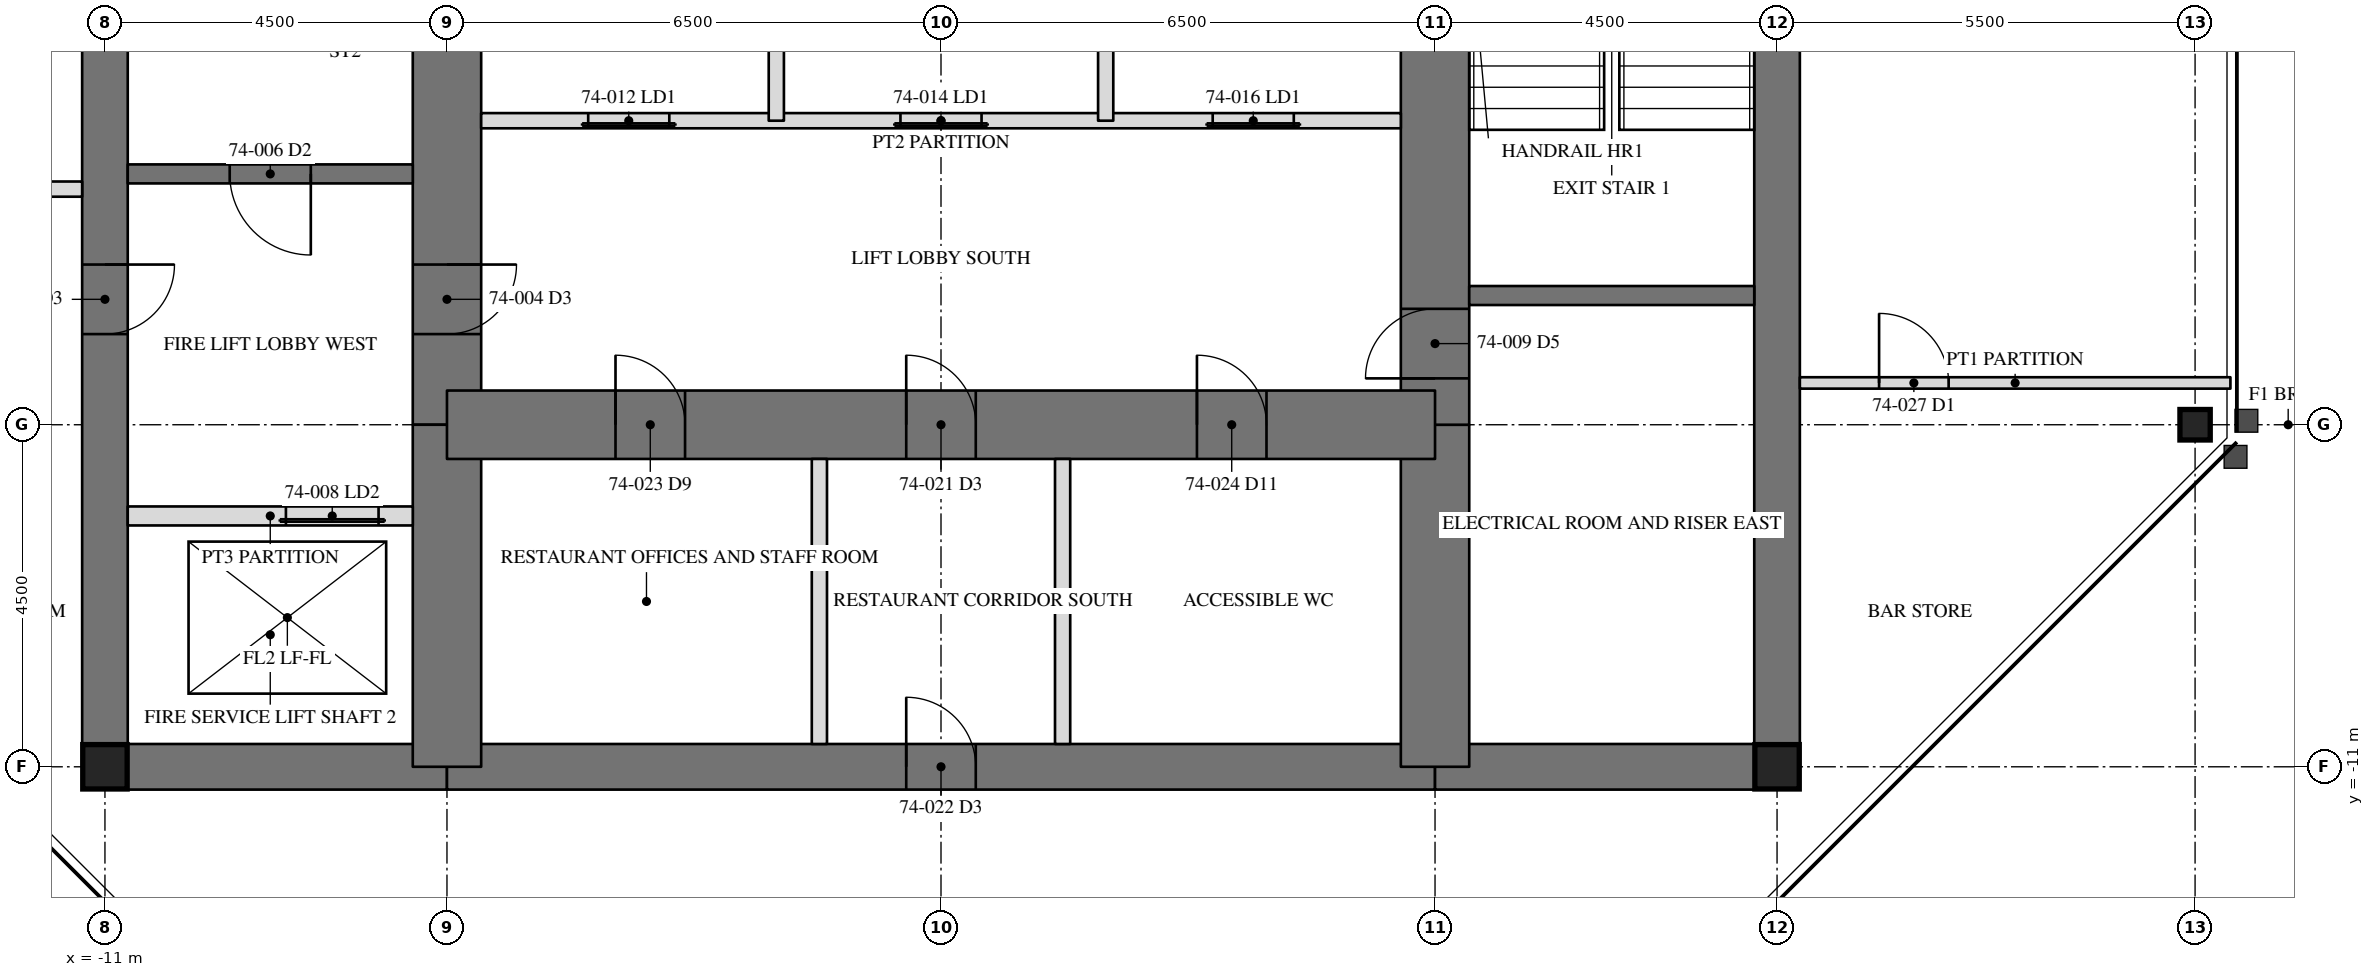
"""IFC4 building model, lengths in metres.
Left out: names, types, materials, properties, quantities, classifications, styles, units other than length and angle.
Written with IfcOpenShell. Run it as: python <this file> out.ifc"""

import sys

from ifc_helpers import new_model, si_unit, direction, frame, frame_2d, origin, origin_2d, place, context, subcontext, project, spatial, rectangle, hollow_rectangle, i_section, extrude, element, fill, save


model = new_model("IFC4")
c1 = context("Model", 3, precision=1e-05, world=origin(), true_north=direction((0.0, 1.0)))
c2 = subcontext(c1, "Body", "Model", "MODEL_VIEW")
j1 = project(units=[si_unit("LENGTHUNIT", "METRE"), si_unit("PLANEANGLEUNIT", "RADIAN")], contexts=[c1])
p1 = place(None, origin())
s1 = spatial("IfcSite", under=j1, at=p1, CompositionType="ELEMENT")
p2 = place(p1, origin())
s2 = spatial("IfcBuilding", under=s1, at=p2, CompositionType="ELEMENT")
p3 = place(p2, frame((0.0, 0.0, 299.2)))
s3 = spatial("IfcBuildingStorey", under=s2, at=p3, CompositionType="ELEMENT", Elevation=299.2)
p4 = place(p3, frame((16.5, -6.5, 0.0), z_axis=(0.0, 0.0, 1.0), x_axis=(0.0, 1.0, 0.0)))
e1 = element("IfcColumn", 1, at=p4, inside=s3, PredefinedType="COLUMN", context=c2, shape_type="SweptSolid", body=[
    extrude(i_section(OverallWidth=0.401, OverallDepth=0.399, WebThickness=0.025, FlangeThickness=0.04, at=origin_2d()), origin(), (0.0, 0.0, 1.0), 5.0),
])
p5 = place(p3, frame((11.0, -11.0, 0.0), z_axis=(0.0, 0.0, 1.0), x_axis=(0.0, 1.0, 0.0)))
e2 = element("IfcWall", 2, at=p5, inside=s3, PredefinedType="SHEAR", context=c2, shape_type="SweptSolid", body=[
    extrude(rectangle(XDim=22.0, YDim=0.6, at=frame_2d((11.0, 0.0))), origin(), (0.0, 0.0, 1.0), 5.0),
])
p6 = place(p5, frame((15.393, 0.0, 0.0)))
e3 = element("IfcOpeningElement", 3, at=p6, cuts=e2, PredefinedType="OPENING", context=c2, shape_type="SweptSolid", body=[
    extrude(rectangle(XDim=0.915, YDim=2.134, at=frame_2d((0.458, 1.067))), frame((0.0, 0.31, 0.0), z_axis=(0.0, -1.0, 0.0), x_axis=(1.0, 0.0, 0.0)), (0.0, 0.0, 1.0), 0.62),
])
p7 = place(p3, frame((-11.0, 11.0, 0.0), z_axis=(0.0, 0.0, 1.0), x_axis=(0.0, -1.0, 0.0)))
e4 = element("IfcWall", 4, at=p7, inside=s3, PredefinedType="SHEAR", context=c2, shape_type="SweptSolid", body=[
    extrude(rectangle(XDim=22.0, YDim=0.6, at=frame_2d((11.0, 0.0))), origin(), (0.0, 0.0, 1.0), 5.0),
])
p8 = place(p7, frame((15.393, 0.0, 0.0)))
e5 = element("IfcOpeningElement", 5, at=p8, cuts=e4, PredefinedType="OPENING", context=c2, shape_type="SweptSolid", body=[
    extrude(rectangle(XDim=0.915, YDim=2.134, at=frame_2d((0.458, 1.067))), frame((0.0, 0.31, 0.0), z_axis=(0.0, -1.0, 0.0), x_axis=(1.0, 0.0, 0.0)), (0.0, 0.0, 1.0), 0.62),
])
p9 = place(p3, frame((-11.0, -11.0, 0.0), z_axis=(0.0, 0.0, 1.0), x_axis=(1.0, 0.0, 0.0)))
e6 = element("IfcWall", 6, at=p9, inside=s3, PredefinedType="SHEAR", context=c2, shape_type="SweptSolid", body=[
    extrude(rectangle(XDim=4.5, YDim=0.6, at=frame_2d((2.25, 0.0))), origin(), (0.0, 0.0, 1.0), 5.0),
])
p10 = place(p3, frame((-6.5, -11.0, 0.0), z_axis=(0.0, 0.0, 1.0), x_axis=(1.0, 0.0, 0.0)))
e7 = element("IfcWall", 7, at=p10, inside=s3, PredefinedType="SHEAR", context=c2, shape_type="SweptSolid", body=[
    extrude(rectangle(XDim=13.0, YDim=0.6, at=frame_2d((6.5, 0.0))), origin(), (0.0, 0.0, 1.0), 5.0),
])
p11 = place(p10, frame((6.042, 0.0, 0.0)))
e8 = element("IfcOpeningElement", 8, at=p11, cuts=e7, PredefinedType="OPENING", context=c2, shape_type="SweptSolid", body=[
    extrude(rectangle(XDim=0.915, YDim=2.134, at=frame_2d((0.458, 1.067))), frame((0.0, 0.31, 0.0), z_axis=(0.0, -1.0, 0.0), x_axis=(1.0, 0.0, 0.0)), (0.0, 0.0, 1.0), 0.62),
])
p12 = place(p3, frame((6.5, -11.0, 0.0), z_axis=(0.0, 0.0, 1.0), x_axis=(1.0, 0.0, 0.0)))
e9 = element("IfcWall", 9, at=p12, inside=s3, PredefinedType="SHEAR", context=c2, shape_type="SweptSolid", body=[
    extrude(rectangle(XDim=4.5, YDim=0.6, at=frame_2d((2.25, 0.0))), origin(), (0.0, 0.0, 1.0), 5.0),
])
p13 = place(p3, frame((6.5, -11.0, 0.0), z_axis=(0.0, 0.0, 1.0), x_axis=(0.0, 1.0, 0.0)))
e10 = element("IfcWall", 10, at=p13, inside=s3, PredefinedType="SHEAR", context=c2, shape_type="SweptSolid", body=[
    extrude(rectangle(XDim=4.5, YDim=0.9, at=frame_2d((2.25, 0.0))), origin(), (0.0, 0.0, 1.0), 5.0),
])
p14 = place(p3, frame((6.5, -6.5, 0.0), z_axis=(0.0, 0.0, 1.0), x_axis=(0.0, 1.0, 0.0)))
e11 = element("IfcWall", 11, at=p14, inside=s3, PredefinedType="SHEAR", context=c2, shape_type="SweptSolid", body=[
    extrude(rectangle(XDim=13.0, YDim=0.9, at=frame_2d((6.5, 0.0))), origin(), (0.0, 0.0, 1.0), 5.0),
])
p15 = place(p14, frame((10.893, 0.0, 0.0)))
e12 = element("IfcOpeningElement", 12, at=p15, cuts=e11, PredefinedType="OPENING", context=c2, shape_type="SweptSolid", body=[
    extrude(rectangle(XDim=0.915, YDim=2.134, at=frame_2d((0.458, 1.067))), frame((0.0, 0.46, 0.0), z_axis=(0.0, -1.0, 0.0), x_axis=(1.0, 0.0, 0.0)), (0.0, 0.0, 1.0), 0.92),
])
p16 = place(p14, frame((0.61, 0.0, 0.0)))
e13 = element("IfcOpeningElement", 13, at=p16, cuts=e11, PredefinedType="OPENING", context=c2, shape_type="SweptSolid", body=[
    extrude(rectangle(XDim=0.915, YDim=2.134, at=frame_2d((0.458, 1.067))), frame((0.0, 0.46, 0.0), z_axis=(0.0, -1.0, 0.0), x_axis=(1.0, 0.0, 0.0)), (0.0, 0.0, 1.0), 0.92),
])
p17 = place(p3, frame((-6.5, 6.5, 0.0), z_axis=(0.0, 0.0, 1.0), x_axis=(0.0, -1.0, 0.0)))
e14 = element("IfcWall", 14, at=p17, inside=s3, PredefinedType="SHEAR", context=c2, shape_type="SweptSolid", body=[
    extrude(rectangle(XDim=13.0, YDim=0.9, at=frame_2d((6.5, 0.0))), origin(), (0.0, 0.0, 1.0), 5.0),
])
p18 = place(p17, frame((10.893, 0.0, 0.0)))
e15 = element("IfcOpeningElement", 15, at=p18, cuts=e14, PredefinedType="OPENING", context=c2, shape_type="SweptSolid", body=[
    extrude(rectangle(XDim=0.915, YDim=2.134, at=frame_2d((0.458, 1.067))), frame((0.0, 0.46, 0.0), z_axis=(0.0, -1.0, 0.0), x_axis=(1.0, 0.0, 0.0)), (0.0, 0.0, 1.0), 0.92),
])
p19 = place(p17, frame((0.61, 0.0, 0.0)))
e16 = element("IfcOpeningElement", 16, at=p19, cuts=e14, PredefinedType="OPENING", context=c2, shape_type="SweptSolid", body=[
    extrude(rectangle(XDim=0.915, YDim=2.134, at=frame_2d((0.458, 1.067))), frame((0.0, 0.46, 0.0), z_axis=(0.0, -1.0, 0.0), x_axis=(1.0, 0.0, 0.0)), (0.0, 0.0, 1.0), 0.92),
])
p20 = place(p3, frame((-6.5, -6.5, 0.0), z_axis=(0.0, 0.0, 1.0), x_axis=(0.0, -1.0, 0.0)))
e17 = element("IfcWall", 17, at=p20, inside=s3, PredefinedType="SHEAR", context=c2, shape_type="SweptSolid", body=[
    extrude(rectangle(XDim=4.5, YDim=0.9, at=frame_2d((2.25, 0.0))), origin(), (0.0, 0.0, 1.0), 5.0),
])
p21 = place(p3, frame((-6.5, -6.5, 0.0), z_axis=(0.0, 0.0, 1.0), x_axis=(1.0, 0.0, 0.0)))
e18 = element("IfcWall", 18, at=p21, inside=s3, PredefinedType="SHEAR", context=c2, shape_type="SweptSolid", body=[
    extrude(rectangle(XDim=13.0, YDim=0.9, at=frame_2d((6.5, 0.0))), origin(), (0.0, 0.0, 1.0), 5.0),
])
p22 = place(p21, frame((6.042, 0.0, 0.0)))
e19 = element("IfcOpeningElement", 19, at=p22, cuts=e18, PredefinedType="OPENING", context=c2, shape_type="SweptSolid", body=[
    extrude(rectangle(XDim=0.915, YDim=2.134, at=frame_2d((0.458, 1.067))), frame((0.0, 0.46, 0.0), z_axis=(0.0, -1.0, 0.0), x_axis=(1.0, 0.0, 0.0)), (0.0, 0.0, 1.0), 0.92),
])
p23 = place(p21, frame((2.218, 0.0, 0.0)))
e20 = element("IfcOpeningElement", 20, at=p23, cuts=e18, PredefinedType="OPENING", context=c2, shape_type="SweptSolid", body=[
    extrude(rectangle(XDim=0.915, YDim=2.134, at=frame_2d((0.458, 1.067))), frame((0.0, 0.46, 0.0), z_axis=(0.0, -1.0, 0.0), x_axis=(1.0, 0.0, 0.0)), (0.0, 0.0, 1.0), 0.92),
])
p24 = place(p21, frame((9.867, 0.0, 0.0)))
e21 = element("IfcOpeningElement", 21, at=p24, cuts=e18, PredefinedType="OPENING", context=c2, shape_type="SweptSolid", body=[
    extrude(rectangle(XDim=0.915, YDim=2.134, at=frame_2d((0.458, 1.067))), frame((0.0, 0.46, 0.0), z_axis=(0.0, -1.0, 0.0), x_axis=(1.0, 0.0, 0.0)), (0.0, 0.0, 1.0), 0.92),
])
for number, where, z_axis, x_axis in (
    (22, (-11.0, -11.0, 0.0), (0.0, 0.0, 1.0), (1.0, 0.0, 0.0)),
    (23, (11.0, -11.0, 0.0), (0.0, 0.0, 1.0), (1.0, 0.0, 0.0)),
):
    element("IfcColumn", number, at=place(p3, frame(where, z_axis=z_axis, x_axis=x_axis)), inside=s3, PredefinedType="COLUMN", context=c2, shape_type="SweptSolid", body=[
        extrude(hollow_rectangle(XDim=0.584, YDim=0.584, WallThickness=0.051, at=origin_2d()), origin(), (0.0, 0.0, 1.0), 5.0),
    ])
p25 = place(p3, frame((6.95, -4.8, 0.0), z_axis=(0.0, 0.0, 1.0), x_axis=(1.0, 0.0, 0.0)))
e24 = element("IfcWall", 24, at=p25, inside=s3, PredefinedType="SOLIDWALL", context=c2, shape_type="SweptSolid", body=[
    extrude(rectangle(XDim=3.75, YDim=0.25, at=frame_2d((1.875, 0.0))), origin(), (0.0, 0.0, 1.0), 4.81),
])
p26 = place(p3, frame((-6.95, -3.2, 0.0), z_axis=(0.0, 0.0, 1.0), x_axis=(-1.0, 0.0, 0.0)))
e25 = element("IfcWall", 25, at=p26, inside=s3, PredefinedType="SOLIDWALL", context=c2, shape_type="SweptSolid", body=[
    extrude(rectangle(XDim=3.75, YDim=0.25, at=frame_2d((1.875, 0.0))), origin(), (0.0, 0.0, 1.0), 4.81),
])
p27 = place(p26, frame((1.342, 0.0, 0.0)))
e26 = element("IfcOpeningElement", 26, at=p27, cuts=e25, PredefinedType="OPENING", context=c2, shape_type="SweptSolid", body=[
    extrude(rectangle(XDim=1.067, YDim=2.134, at=frame_2d((0.533, 1.067))), frame((0.0, 0.135, 0.0), z_axis=(0.0, -1.0, 0.0), x_axis=(1.0, 0.0, 0.0)), (0.0, 0.0, 1.0), 0.27),
])
p28 = place(p3, frame((-6.95, -7.7, 0.0), z_axis=(0.0, 0.0, 1.0), x_axis=(-1.0, 0.0, 0.0)))
e27 = element("IfcWall", 27, at=p28, inside=s3, PredefinedType="PARTITIONING", context=c2, shape_type="SweptSolid", body=[
    extrude(rectangle(XDim=3.75, YDim=0.25, at=frame_2d((1.875, 0.0))), origin(), (0.0, 0.0, 1.0), 4.81),
])
p29 = place(p28, frame((0.45, 0.0, 0.0)))
e28 = element("IfcOpeningElement", 28, at=p29, cuts=e27, PredefinedType="OPENING", context=c2, shape_type="SweptSolid", body=[
    extrude(rectangle(XDim=1.219, YDim=2.134, at=frame_2d((0.609, 1.067))), frame((0.0, 0.135, 0.0), z_axis=(0.0, -1.0, 0.0), x_axis=(1.0, 0.0, 0.0)), (0.0, 0.0, 1.0), 0.27),
])
p30 = place(p3, frame((6.05, -2.5, 0.0), z_axis=(0.0, 0.0, 1.0), x_axis=(-1.0, 0.0, 0.0)))
e29 = element("IfcWall", 29, at=p30, inside=s3, PredefinedType="PARTITIONING", context=c2, shape_type="SweptSolid", body=[
    extrude(rectangle(XDim=12.1, YDim=0.2, at=frame_2d((6.05, 0.0))), origin(), (0.0, 0.0, 1.0), 4.81),
])
p31 = place(p30, frame((9.625, 0.0, 0.0)))
e30 = element("IfcOpeningElement", 30, at=p31, cuts=e29, PredefinedType="OPENING", context=c2, shape_type="SweptSolid", body=[
    extrude(rectangle(XDim=1.067, YDim=2.134, at=frame_2d((0.533, 1.067))), frame((0.0, 0.11, 0.0), z_axis=(0.0, -1.0, 0.0), x_axis=(1.0, 0.0, 0.0)), (0.0, 0.0, 1.0), 0.22),
])
p32 = place(p30, frame((5.517, 0.0, 0.0)))
e31 = element("IfcOpeningElement", 31, at=p32, cuts=e29, PredefinedType="OPENING", context=c2, shape_type="SweptSolid", body=[
    extrude(rectangle(XDim=1.067, YDim=2.134, at=frame_2d((0.533, 1.067))), frame((0.0, 0.11, 0.0), z_axis=(0.0, -1.0, 0.0), x_axis=(1.0, 0.0, 0.0)), (0.0, 0.0, 1.0), 0.22),
])
p33 = place(p30, frame((1.408, 0.0, 0.0)))
e32 = element("IfcOpeningElement", 32, at=p33, cuts=e29, PredefinedType="OPENING", context=c2, shape_type="SweptSolid", body=[
    extrude(rectangle(XDim=1.067, YDim=2.134, at=frame_2d((0.533, 1.067))), frame((0.0, 0.11, 0.0), z_axis=(0.0, -1.0, 0.0), x_axis=(1.0, 0.0, 0.0)), (0.0, 0.0, 1.0), 0.22),
])
for number, where, z_axis, x_axis in (
    (33, (-2.167, -2.5, 0.0), (0.0, 0.0, 1.0), (0.0, 1.0, 0.0)),
    (34, (2.167, -2.5, 0.0), (0.0, 0.0, 1.0), (0.0, 1.0, 0.0)),
):
    element("IfcWall", number, at=place(p3, frame(where, z_axis=z_axis, x_axis=x_axis)), inside=s3, PredefinedType="PARTITIONING", context=c2, shape_type="SweptSolid", body=[
        extrude(rectangle(XDim=5.0, YDim=0.2, at=frame_2d((2.5, 0.0))), origin(), (0.0, 0.0, 1.0), 4.81),
    ])
for number, where, z_axis, x_axis in (
    (35, (-1.6, -6.95, 0.0), (0.0, 0.0, 1.0), (0.0, -1.0, 0.0)),
    (36, (1.6, -6.95, 0.0), (0.0, 0.0, 1.0), (0.0, -1.0, 0.0)),
):
    element("IfcWall", number, at=place(p3, frame(where, z_axis=z_axis, x_axis=x_axis)), inside=s3, PredefinedType="PARTITIONING", context=c2, shape_type="SweptSolid", body=[
        extrude(rectangle(XDim=3.75, YDim=0.2, at=frame_2d((1.875, 0.0))), origin(), (0.0, 0.0, 1.0), 4.81),
    ])
p34 = place(p3, frame((-11.3, -3.4, 0.0), z_axis=(0.0, 0.0, 1.0), x_axis=(-1.0, 0.0, 0.0)))
e37 = element("IfcWall", 37, at=p34, inside=s3, PredefinedType="PARTITIONING", context=c2, shape_type="SweptSolid", body=[
    extrude(rectangle(XDim=5.615, YDim=0.2, at=frame_2d((2.808, 0.0))), origin(), (0.0, 0.0, 1.0), 4.109),
])
p35 = place(p34, frame((2.268, 0.0, 0.0)))
e38 = element("IfcOpeningElement", 38, at=p35, cuts=e37, PredefinedType="OPENING", context=c2, shape_type="SweptSolid", body=[
    extrude(rectangle(XDim=0.915, YDim=2.134, at=frame_2d((0.458, 1.067))), frame((0.0, 0.11, 0.0), z_axis=(0.0, -1.0, 0.0), x_axis=(1.0, 0.0, 0.0)), (0.0, 0.0, 1.0), 0.22),
])
p36 = place(p3, frame((11.3, -5.95, 0.0), z_axis=(0.0, 0.0, 1.0), x_axis=(1.0, 0.0, 0.0)))
e39 = element("IfcWall", 39, at=p36, inside=s3, PredefinedType="PARTITIONING", context=c2, shape_type="SweptSolid", body=[
    extrude(rectangle(XDim=5.665, YDim=0.15, at=frame_2d((2.833, 0.0))), origin(), (0.0, 0.0, 1.0), 4.81),
])
p37 = place(p36, frame((1.042, 0.0, 0.0)))
e40 = element("IfcOpeningElement", 40, at=p37, cuts=e39, PredefinedType="OPENING", context=c2, shape_type="SweptSolid", body=[
    extrude(rectangle(XDim=0.915, YDim=2.134, at=frame_2d((0.458, 1.067))), frame((0.0, 0.085, 0.0), z_axis=(0.0, -1.0, 0.0), x_axis=(1.0, 0.0, 0.0)), (0.0, 0.0, 1.0), 0.17),
])
p38 = place(p8, origin())
e41 = element("IfcDoor", 41, at=p38, inside=s3, OperationType="SINGLE_SWING_RIGHT", PredefinedType="DOOR", context=c2, shape_type="SweptSolid", body=[
    extrude(rectangle(XDim=0.915, YDim=2.134, at=frame_2d((0.458, 1.067))), frame((0.0, -0.225, 0.0), z_axis=(0.0, -1.0, 0.0), x_axis=(1.0, 0.0, 0.0)), (0.0, 0.0, 1.0), 0.05),
])
fill(e5, e41)
p39 = place(p18, origin())
e42 = element("IfcDoor", 42, at=p39, inside=s3, OperationType="SINGLE_SWING_RIGHT", PredefinedType="DOOR", context=c2, shape_type="SweptSolid", body=[
    extrude(rectangle(XDim=0.915, YDim=2.134, at=frame_2d((0.458, 1.067))), frame((0.0, -0.375, 0.0), z_axis=(0.0, -1.0, 0.0), x_axis=(1.0, 0.0, 0.0)), (0.0, 0.0, 1.0), 0.05),
])
fill(e15, e42)
p40 = place(p27, origin())
e43 = element("IfcDoor", 43, at=p40, inside=s3, OperationType="SINGLE_SWING_LEFT", PredefinedType="DOOR", context=c2, shape_type="SweptSolid", body=[
    extrude(rectangle(XDim=1.067, YDim=2.134, at=frame_2d((0.533, 1.067))), frame((0.0, 0.025, 0.0), z_axis=(0.0, -1.0, 0.0), x_axis=(1.0, 0.0, 0.0)), (0.0, 0.0, 1.0), 0.05),
])
fill(e26, e43)
p41 = place(p29, origin())
e44 = element("IfcDoor", 44, at=p41, inside=s3, OperationType="SLIDING_TO_LEFT", PredefinedType="DOOR", context=c2, shape_type="SweptSolid", body=[
    extrude(rectangle(XDim=1.219, YDim=2.134, at=frame_2d((0.609, 1.067))), frame((0.0, 0.025, 0.0), z_axis=(0.0, -1.0, 0.0), x_axis=(1.0, 0.0, 0.0)), (0.0, 0.0, 1.0), 0.05),
])
fill(e28, e44)
p42 = place(p16, origin())
e45 = element("IfcDoor", 45, at=p42, inside=s3, OperationType="SINGLE_SWING_RIGHT", PredefinedType="DOOR", context=c2, shape_type="SweptSolid", body=[
    extrude(rectangle(XDim=0.915, YDim=2.134, at=frame_2d((0.458, 1.067))), frame((0.0, -0.375, 0.0), z_axis=(0.0, -1.0, 0.0), x_axis=(1.0, 0.0, 0.0)), (0.0, 0.0, 1.0), 0.05),
])
fill(e13, e45)
p43 = place(p31, origin())
e46 = element("IfcDoor", 46, at=p43, inside=s3, OperationType="SLIDING_TO_LEFT", PredefinedType="DOOR", context=c2, shape_type="SweptSolid", body=[
    extrude(rectangle(XDim=1.067, YDim=2.134, at=frame_2d((0.533, 1.067))), frame((0.0, 0.025, 0.0), z_axis=(0.0, -1.0, 0.0), x_axis=(1.0, 0.0, 0.0)), (0.0, 0.0, 1.0), 0.05),
])
fill(e30, e46)
p44 = place(p32, origin())
e47 = element("IfcDoor", 47, at=p44, inside=s3, OperationType="SLIDING_TO_LEFT", PredefinedType="DOOR", context=c2, shape_type="SweptSolid", body=[
    extrude(rectangle(XDim=1.067, YDim=2.134, at=frame_2d((0.533, 1.067))), frame((0.0, 0.025, 0.0), z_axis=(0.0, -1.0, 0.0), x_axis=(1.0, 0.0, 0.0)), (0.0, 0.0, 1.0), 0.05),
])
fill(e31, e47)
p45 = place(p33, origin())
e48 = element("IfcDoor", 48, at=p45, inside=s3, OperationType="SLIDING_TO_LEFT", PredefinedType="DOOR", context=c2, shape_type="SweptSolid", body=[
    extrude(rectangle(XDim=1.067, YDim=2.134, at=frame_2d((0.533, 1.067))), frame((0.0, 0.025, 0.0), z_axis=(0.0, -1.0, 0.0), x_axis=(1.0, 0.0, 0.0)), (0.0, 0.0, 1.0), 0.05),
])
fill(e32, e48)
p46 = place(p22, origin())
e49 = element("IfcDoor", 49, at=p46, inside=s3, OperationType="SINGLE_SWING_RIGHT", PredefinedType="DOOR", context=c2, shape_type="SweptSolid", body=[
    extrude(rectangle(XDim=0.915, YDim=2.134, at=frame_2d((0.458, 1.067))), frame((0.0, -0.375, 0.0), z_axis=(0.0, -1.0, 0.0), x_axis=(1.0, 0.0, 0.0)), (0.0, 0.0, 1.0), 0.05),
])
fill(e19, e49)
p47 = place(p11, origin())
e50 = element("IfcDoor", 50, at=p47, inside=s3, OperationType="SINGLE_SWING_RIGHT", PredefinedType="DOOR", context=c2, shape_type="SweptSolid", body=[
    extrude(rectangle(XDim=0.915, YDim=2.134, at=frame_2d((0.458, 1.067))), frame((0.0, -0.225, 0.0), z_axis=(0.0, -1.0, 0.0), x_axis=(1.0, 0.0, 0.0)), (0.0, 0.0, 1.0), 0.05),
])
fill(e8, e50)
p48 = place(p23, origin())
e51 = element("IfcDoor", 51, at=p48, inside=s3, OperationType="SINGLE_SWING_LEFT", PredefinedType="DOOR", context=c2, shape_type="SweptSolid", body=[
    extrude(rectangle(XDim=0.915, YDim=2.134, at=frame_2d((0.458, 1.067))), frame((0.0, -0.375, 0.0), z_axis=(0.0, -1.0, 0.0), x_axis=(1.0, 0.0, 0.0)), (0.0, 0.0, 1.0), 0.05),
])
fill(e20, e51)
p49 = place(p24, origin())
e52 = element("IfcDoor", 52, at=p49, inside=s3, OperationType="SINGLE_SWING_LEFT", PredefinedType="DOOR", context=c2, shape_type="SweptSolid", body=[
    extrude(rectangle(XDim=0.915, YDim=2.134, at=frame_2d((0.458, 1.067))), frame((0.0, -0.375, 0.0), z_axis=(0.0, -1.0, 0.0), x_axis=(1.0, 0.0, 0.0)), (0.0, 0.0, 1.0), 0.05),
])
fill(e21, e52)
p50 = place(p37, origin())
e53 = element("IfcDoor", 53, at=p50, inside=s3, OperationType="SINGLE_SWING_LEFT", PredefinedType="DOOR", context=c2, shape_type="SweptSolid", body=[
    extrude(rectangle(XDim=0.915, YDim=2.134, at=frame_2d((0.458, 1.067))), frame((0.0, 0.025, 0.0), z_axis=(0.0, -1.0, 0.0), x_axis=(1.0, 0.0, 0.0)), (0.0, 0.0, 1.0), 0.05),
])
fill(e40, e53)
save(model, sys.argv[1])
